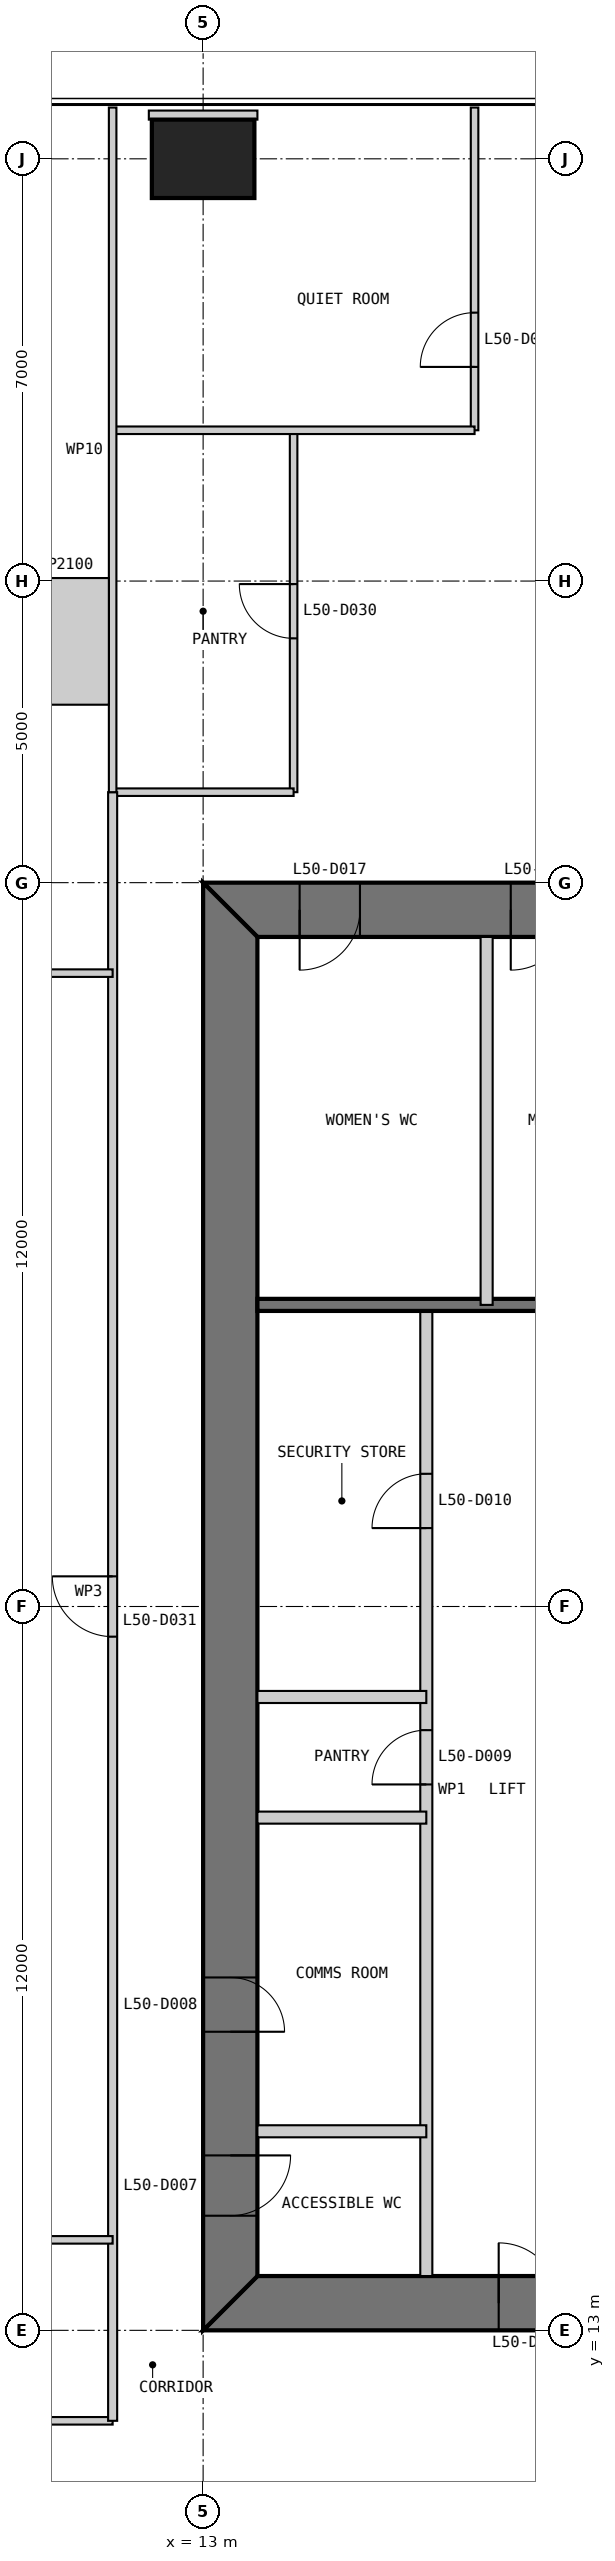
"""IFC4 building model, lengths in metres.
Left out: names, types, materials, properties, quantities, classifications, styles, units other than length and angle.
Written with IfcOpenShell. Run it as: python <this file> out.ifc"""

import sys

from ifc_helpers import new_model, si_unit, direction, frame, frame_2d, origin, origin_2d, place, context, subcontext, project, spatial, polyline, rectangle, outline, extrude, element, fill, save


model = new_model("IFC4")
c1 = context("Model", 3, precision=1e-05, world=origin(), true_north=direction((0.0, 1.0)))
c2 = subcontext(c1, "Body", "Model", "MODEL_VIEW")
j1 = project(units=[si_unit("LENGTHUNIT", "METRE"), si_unit("PLANEANGLEUNIT", "RADIAN")], contexts=[c1])
p1 = place(None, origin())
s1 = spatial("IfcSite", under=j1, at=p1, CompositionType="ELEMENT")
p2 = place(p1, origin())
s2 = spatial("IfcBuilding", under=s1, at=p2, CompositionType="ELEMENT")
p3 = place(p2, frame((0.0, 0.0, 213.8)))
s3 = spatial("IfcBuildingStorey", under=s2, at=p3, CompositionType="ELEMENT", Elevation=213.8)
p4 = place(p3, frame((13.0, 49.0, 0.0), z_axis=(0.0, 0.0, 1.0), x_axis=(1.0, 0.0, 0.0)))
e1 = element("IfcColumn", 1, at=p4, inside=s3, PredefinedType="COLUMN", context=c2, shape_type="SweptSolid", body=[
    extrude(rectangle(XDim=1.7, YDim=1.3, at=origin_2d()), origin(), (0.0, 0.0, 1.0), 4.0),
])
p5 = place(p3, frame((13.0, 13.45, 0.0), z_axis=(0.0, 0.0, 1.0), x_axis=(1.0, 0.0, 0.0)))
e2 = element("IfcWall", 2, at=p5, inside=s3, PredefinedType="SHEAR", context=c2, shape_type="SweptSolid", body=[
    extrude(outline(polyline([(0.0, -0.45), (24.0, -0.45), (23.1, 0.45), (0.9, 0.45), (0.0, -0.45)])), origin(), (0.0, 0.0, 1.0), 4.0),
])
p6 = place(p5, frame((4.9, 0.0, 0.0)))
e3 = element("IfcOpeningElement", 3, at=p6, cuts=e2, PredefinedType="OPENING", context=c2, shape_type="SweptSolid", body=[
    extrude(rectangle(XDim=1.0, YDim=2.2, at=frame_2d((0.5, 1.1))), frame((0.0, 0.46, 0.0), z_axis=(0.0, -1.0, 0.0), x_axis=(1.0, 0.0, 0.0)), (0.0, 0.0, 1.0), 0.92),
])
p7 = place(p5, frame((8.9, 0.0, 0.0)))
e4 = element("IfcOpeningElement", 4, at=p7, cuts=e2, PredefinedType="OPENING", context=c2, shape_type="SweptSolid", body=[
    extrude(rectangle(XDim=1.1, YDim=2.2, at=frame_2d((0.55, 1.1))), frame((0.0, 0.46, 0.0), z_axis=(0.0, -1.0, 0.0), x_axis=(1.0, 0.0, 0.0)), (0.0, 0.0, 1.0), 0.92),
])
p8 = place(p5, frame((15.05, 0.0, 0.0)))
e5 = element("IfcOpeningElement", 5, at=p8, cuts=e2, PredefinedType="OPENING", context=c2, shape_type="SweptSolid", body=[
    extrude(rectangle(XDim=0.9, YDim=2.2, at=frame_2d((0.45, 1.1))), frame((0.0, 0.46, 0.0), z_axis=(0.0, -1.0, 0.0), x_axis=(1.0, 0.0, 0.0)), (0.0, 0.0, 1.0), 0.92),
])
p9 = place(p5, frame((17.9, 0.0, 0.0)))
e6 = element("IfcOpeningElement", 6, at=p9, cuts=e2, PredefinedType="OPENING", context=c2, shape_type="SweptSolid", body=[
    extrude(rectangle(XDim=1.0, YDim=2.2, at=frame_2d((0.5, 1.1))), frame((0.0, 0.46, 0.0), z_axis=(0.0, -1.0, 0.0), x_axis=(1.0, 0.0, 0.0)), (0.0, 0.0, 1.0), 0.92),
])
p10 = place(p5, frame((21.4, 0.0, 0.0)))
e7 = element("IfcOpeningElement", 7, at=p10, cuts=e2, PredefinedType="OPENING", context=c2, shape_type="SweptSolid", body=[
    extrude(rectangle(XDim=1.0, YDim=2.2, at=frame_2d((0.5, 1.1))), frame((0.0, 0.46, 0.0), z_axis=(0.0, -1.0, 0.0), x_axis=(1.0, 0.0, 0.0)), (0.0, 0.0, 1.0), 0.92),
])
p11 = place(p3, frame((37.0, 36.55, 0.0), z_axis=(0.0, 0.0, 1.0), x_axis=(-1.0, 0.0, 0.0)))
e8 = element("IfcWall", 8, at=p11, inside=s3, PredefinedType="SHEAR", context=c2, shape_type="SweptSolid", body=[
    extrude(outline(polyline([(0.0, -0.45), (24.0, -0.45), (23.1, 0.45), (0.9, 0.45), (0.0, -0.45)])), origin(), (0.0, 0.0, 1.0), 4.0),
])
p12 = place(p11, frame((4.9, 0.0, 0.0)))
e9 = element("IfcOpeningElement", 9, at=p12, cuts=e8, PredefinedType="OPENING", context=c2, shape_type="SweptSolid", body=[
    extrude(rectangle(XDim=1.0, YDim=2.2, at=frame_2d((0.5, 1.1))), frame((0.0, 0.46, 0.0), z_axis=(0.0, -1.0, 0.0), x_axis=(1.0, 0.0, 0.0)), (0.0, 0.0, 1.0), 0.92),
])
p13 = place(p11, frame((8.9, 0.0, 0.0)))
e10 = element("IfcOpeningElement", 10, at=p13, cuts=e8, PredefinedType="OPENING", context=c2, shape_type="SweptSolid", body=[
    extrude(rectangle(XDim=1.1, YDim=2.2, at=frame_2d((0.55, 1.1))), frame((0.0, 0.46, 0.0), z_axis=(0.0, -1.0, 0.0), x_axis=(1.0, 0.0, 0.0)), (0.0, 0.0, 1.0), 0.92),
])
p14 = place(p11, frame((15.05, 0.0, 0.0)))
e11 = element("IfcOpeningElement", 11, at=p14, cuts=e8, PredefinedType="OPENING", context=c2, shape_type="SweptSolid", body=[
    extrude(rectangle(XDim=0.9, YDim=2.2, at=frame_2d((0.45, 1.1))), frame((0.0, 0.46, 0.0), z_axis=(0.0, -1.0, 0.0), x_axis=(1.0, 0.0, 0.0)), (0.0, 0.0, 1.0), 0.92),
])
p15 = place(p11, frame((17.9, 0.0, 0.0)))
e12 = element("IfcOpeningElement", 12, at=p15, cuts=e8, PredefinedType="OPENING", context=c2, shape_type="SweptSolid", body=[
    extrude(rectangle(XDim=1.0, YDim=2.2, at=frame_2d((0.5, 1.1))), frame((0.0, 0.46, 0.0), z_axis=(0.0, -1.0, 0.0), x_axis=(1.0, 0.0, 0.0)), (0.0, 0.0, 1.0), 0.92),
])
p16 = place(p11, frame((21.4, 0.0, 0.0)))
e13 = element("IfcOpeningElement", 13, at=p16, cuts=e8, PredefinedType="OPENING", context=c2, shape_type="SweptSolid", body=[
    extrude(rectangle(XDim=1.0, YDim=2.2, at=frame_2d((0.5, 1.1))), frame((0.0, 0.46, 0.0), z_axis=(0.0, -1.0, 0.0), x_axis=(1.0, 0.0, 0.0)), (0.0, 0.0, 1.0), 0.92),
])
p17 = place(p3, frame((13.45, 36.1, 0.0), z_axis=(0.0, 0.0, 1.0), x_axis=(0.0, -1.0, 0.0)))
e14 = element("IfcWall", 14, at=p17, inside=s3, PredefinedType="SHEAR", context=c2, shape_type="SweptSolid", body=[
    extrude(outline(polyline([(-0.9, -0.45), (23.1, -0.45), (22.2, 0.45), (0.0, 0.45), (-0.9, -0.45)])), origin(), (0.0, 0.0, 1.0), 4.0),
])
p18 = place(p17, frame((20.2, 0.0, 0.0)))
e15 = element("IfcOpeningElement", 15, at=p18, cuts=e14, PredefinedType="OPENING", context=c2, shape_type="SweptSolid", body=[
    extrude(rectangle(XDim=1.0, YDim=2.2, at=frame_2d((0.5, 1.1))), frame((0.0, 0.46, 0.0), z_axis=(0.0, -1.0, 0.0), x_axis=(1.0, 0.0, 0.0)), (0.0, 0.0, 1.0), 0.92),
])
p19 = place(p17, frame((17.25, 0.0, 0.0)))
e16 = element("IfcOpeningElement", 16, at=p19, cuts=e14, PredefinedType="OPENING", context=c2, shape_type="SweptSolid", body=[
    extrude(rectangle(XDim=0.9, YDim=2.2, at=frame_2d((0.45, 1.1))), frame((0.0, 0.46, 0.0), z_axis=(0.0, -1.0, 0.0), x_axis=(1.0, 0.0, 0.0)), (0.0, 0.0, 1.0), 0.92),
])
p20 = place(p3, frame((16.7, 13.9, 0.0), z_axis=(0.0, 0.0, 1.0), x_axis=(0.0, 1.0, 0.0)))
e17 = element("IfcWall", 17, at=p20, inside=s3, PredefinedType="PARTITIONING", context=c2, shape_type="SweptSolid", body=[
    extrude(rectangle(XDim=16.1, YDim=0.2, at=frame_2d((8.05, 0.0))), origin(), (0.0, 0.0, 1.0), 3.8),
])
p21 = place(p20, frame((8.15, 0.0, 0.0)))
e18 = element("IfcOpeningElement", 18, at=p21, cuts=e17, PredefinedType="OPENING", context=c2, shape_type="SweptSolid", body=[
    extrude(rectangle(XDim=0.9, YDim=2.2, at=frame_2d((0.45, 1.1))), frame((0.0, 0.11, 0.0), z_axis=(0.0, -1.0, 0.0), x_axis=(1.0, 0.0, 0.0)), (0.0, 0.0, 1.0), 0.22),
])
p22 = place(p20, frame((12.4, 0.0, 0.0)))
e19 = element("IfcOpeningElement", 19, at=p22, cuts=e17, PredefinedType="OPENING", context=c2, shape_type="SweptSolid", body=[
    extrude(rectangle(XDim=0.9, YDim=2.2, at=frame_2d((0.45, 1.1))), frame((0.0, 0.11, 0.0), z_axis=(0.0, -1.0, 0.0), x_axis=(1.0, 0.0, 0.0)), (0.0, 0.0, 1.0), 0.22),
])
for number, where, z_axis, x_axis in (
    (20, (13.9, 16.3, 0.0), (0.0, 0.0, 1.0), (1.0, 0.0, 0.0)),
    (21, (13.9, 21.5, 0.0), (0.0, 0.0, 1.0), (1.0, 0.0, 0.0)),
    (22, (13.9, 23.5, 0.0), (0.0, 0.0, 1.0), (1.0, 0.0, 0.0)),
):
    element("IfcWall", number, at=place(p3, frame(where, z_axis=z_axis, x_axis=x_axis)), inside=s3, PredefinedType="PARTITIONING", context=c2, shape_type="SweptSolid", body=[
        extrude(rectangle(XDim=2.8, YDim=0.2, at=frame_2d((1.4, 0.0))), origin(), (0.0, 0.0, 1.0), 3.8),
    ])
p23 = place(p3, frame((29.7, 30.0, 0.0), z_axis=(0.0, 0.0, 1.0), x_axis=(-1.0, 0.0, 0.0)))
e23 = element("IfcWall", 23, at=p23, inside=s3, PredefinedType="SOLIDWALL", context=c2, shape_type="SweptSolid", body=[
    extrude(rectangle(XDim=15.8, YDim=0.2, at=frame_2d((7.9, 0.0))), origin(), (0.0, 0.0, 1.0), 3.8),
])
p24 = place(p3, frame((17.7, 36.1, 0.0), z_axis=(0.0, 0.0, 1.0), x_axis=(0.0, -1.0, 0.0)))
e24 = element("IfcWall", 24, at=p24, inside=s3, PredefinedType="PARTITIONING", context=c2, shape_type="SweptSolid", body=[
    extrude(rectangle(XDim=6.1, YDim=0.2, at=frame_2d((3.05, 0.0))), origin(), (0.0, 0.0, 1.0), 3.8),
])
p25 = place(p3, frame((0.15, 11.5, 0.0), z_axis=(0.0, 0.0, 1.0), x_axis=(1.0, 0.0, 0.0)))
e25 = element("IfcWall", 25, at=p25, inside=s3, PredefinedType="PARTITIONING", context=c2, shape_type="SweptSolid", body=[
    extrude(rectangle(XDim=11.35, YDim=0.125, at=frame_2d((5.675, 0.0))), origin(), (0.0, 0.0, 1.0), 3.85),
])
p26 = place(p3, frame((17.5, 49.85, 0.0), z_axis=(0.0, 0.0, 1.0), x_axis=(0.0, -1.0, 0.0)))
e26 = element("IfcWall", 26, at=p26, inside=s3, PredefinedType="PARTITIONING", context=c2, shape_type="SweptSolid", body=[
    extrude(rectangle(XDim=5.35, YDim=0.125, at=frame_2d((2.675, 0.0))), origin(), (0.0, 0.0, 1.0), 3.85),
])
p27 = place(p26, frame((3.4, 0.0, 0.0)))
e27 = element("IfcOpeningElement", 27, at=p27, cuts=e26, PredefinedType="OPENING", context=c2, shape_type="SweptSolid", body=[
    extrude(rectangle(XDim=0.9, YDim=2.2, at=frame_2d((0.45, 1.1))), frame((0.0, 0.073, 0.0), z_axis=(0.0, -1.0, 0.0), x_axis=(1.0, 0.0, 0.0)), (0.0, 0.0, 1.0), 0.145),
])
p28 = place(p3, frame((14.5, 44.5, 0.0), z_axis=(0.0, 0.0, 1.0), x_axis=(0.0, -1.0, 0.0)))
e28 = element("IfcWall", 28, at=p28, inside=s3, PredefinedType="PARTITIONING", context=c2, shape_type="SweptSolid", body=[
    extrude(rectangle(XDim=6.0, YDim=0.125, at=frame_2d((3.0, 0.0))), origin(), (0.0, 0.0, 1.0), 3.85),
])
p29 = place(p28, frame((2.55, 0.0, 0.0)))
e29 = element("IfcOpeningElement", 29, at=p29, cuts=e28, PredefinedType="OPENING", context=c2, shape_type="SweptSolid", body=[
    extrude(rectangle(XDim=0.9, YDim=2.2, at=frame_2d((0.45, 1.1))), frame((0.0, 0.073, 0.0), z_axis=(0.0, -1.0, 0.0), x_axis=(1.0, 0.0, 0.0)), (0.0, 0.0, 1.0), 0.145),
])
p30 = place(p3, frame((17.5, 44.5, 0.0), z_axis=(0.0, 0.0, 1.0), x_axis=(-1.0, 0.0, 0.0)))
e30 = element("IfcWall", 30, at=p30, inside=s3, PredefinedType="PARTITIONING", context=c2, shape_type="SweptSolid", body=[
    extrude(rectangle(XDim=6.0, YDim=0.125, at=frame_2d((3.0, 0.0))), origin(), (0.0, 0.0, 1.0), 3.85),
])
p31 = place(p3, frame((14.5, 38.5, 0.0), z_axis=(0.0, 0.0, 1.0), x_axis=(-1.0, 0.0, 0.0)))
e31 = element("IfcWall", 31, at=p31, inside=s3, PredefinedType="PARTITIONING", context=c2, shape_type="SweptSolid", body=[
    extrude(rectangle(XDim=3.0, YDim=0.125, at=frame_2d((1.5, 0.0))), origin(), (0.0, 0.0, 1.0), 3.85),
])
p32 = place(p3, frame((11.5, 38.5, 0.0), z_axis=(0.0, 0.0, 1.0), x_axis=(0.0, -1.0, 0.0)))
e32 = element("IfcWall", 32, at=p32, inside=s3, PredefinedType="PARTITIONING", context=c2, shape_type="SweptSolid", body=[
    extrude(rectangle(XDim=27.0, YDim=0.15, at=frame_2d((13.5, 0.0))), origin(), (0.0, 0.0, 1.0), 3.85),
])
p33 = place(p32, frame((13.0, 0.0, 0.0)))
e33 = element("IfcOpeningElement", 33, at=p33, cuts=e32, PredefinedType="OPENING", context=c2, shape_type="SweptSolid", body=[
    extrude(rectangle(XDim=1.0, YDim=2.2, at=frame_2d((0.5, 1.1))), frame((0.0, 0.085, 0.0), z_axis=(0.0, -1.0, 0.0), x_axis=(1.0, 0.0, 0.0)), (0.0, 0.0, 1.0), 0.17),
])
p34 = place(p3, frame((11.5, 49.85, 0.0), z_axis=(0.0, 0.0, 1.0), x_axis=(0.0, -1.0, 0.0)))
e34 = element("IfcWall", 34, at=p34, inside=s3, PredefinedType="PARTITIONING", context=c2, shape_type="SweptSolid", body=[
    extrude(rectangle(XDim=11.35, YDim=0.125, at=frame_2d((5.675, 0.0))), origin(), (0.0, 0.0, 1.0), 3.85),
])
p35 = place(p3, frame((0.15, 35.5, 0.0), z_axis=(0.0, 0.0, 1.0), x_axis=(1.0, 0.0, 0.0)))
e35 = element("IfcWall", 35, at=p35, inside=s3, PredefinedType="PARTITIONING", context=c2, shape_type="SweptSolid", body=[
    extrude(rectangle(XDim=11.35, YDim=0.125, at=frame_2d((5.675, 0.0))), origin(), (0.0, 0.0, 1.0), 3.85),
])
p36 = place(p35, frame((7.9, 0.0, 0.0)))
e36 = element("IfcOpeningElement", 36, at=p36, cuts=e35, PredefinedType="OPENING", context=c2, shape_type="SweptSolid", body=[
    extrude(rectangle(XDim=0.9, YDim=2.2, at=frame_2d((0.45, 1.1))), frame((0.0, 0.073, 0.0), z_axis=(0.0, -1.0, 0.0), x_axis=(1.0, 0.0, 0.0)), (0.0, 0.0, 1.0), 0.145),
])
p37 = place(p3, frame((5.5, 14.5, 0.0), z_axis=(0.0, 0.0, 1.0), x_axis=(1.0, 0.0, 0.0)))
e37 = element("IfcWall", 37, at=p37, inside=s3, PredefinedType="PARTITIONING", context=c2, shape_type="SweptSolid", body=[
    extrude(rectangle(XDim=6.0, YDim=0.125, at=frame_2d((3.0, 0.0))), origin(), (0.0, 0.0, 1.0), 3.85),
])
p38 = place(p37, frame((2.55, 0.0, 0.0)))
e38 = element("IfcOpeningElement", 38, at=p38, cuts=e37, PredefinedType="OPENING", context=c2, shape_type="SweptSolid", body=[
    extrude(rectangle(XDim=0.9, YDim=2.2, at=frame_2d((0.45, 1.1))), frame((0.0, 0.073, 0.0), z_axis=(0.0, -1.0, 0.0), x_axis=(1.0, 0.0, 0.0)), (0.0, 0.0, 1.0), 0.145),
])
p39 = place(p3, frame((13.0, 49.8, 0.0), z_axis=(0.0, 0.0, 1.0), x_axis=(0.0, -1.0, 0.0)))
e39 = element("IfcWall", 39, at=p39, inside=s3, PredefinedType="PARTITIONING", context=c2, shape_type="SweptSolid", body=[
    extrude(rectangle(XDim=0.15, YDim=1.8, at=frame_2d((0.075, 0.0))), origin(), (0.0, 0.0, 1.0), 3.85),
])
p40 = place(p3, frame((11.438, 41.0, 0.0), z_axis=(0.0, 0.0, 1.0), x_axis=(-1.0, 0.0, 0.0)))
e40 = element("IfcWall", 40, at=p40, inside=s3, PredefinedType="PARTITIONING", context=c2, shape_type="SweptSolid", body=[
    extrude(rectangle(XDim=1.438, YDim=2.1, at=frame_2d((0.719, 0.0))), origin(), (0.0, 0.0, 1.0), 3.85),
])
p41 = place(p6, origin())
e41 = element("IfcDoor", 41, at=p41, inside=s3, OperationType="SINGLE_SWING_LEFT", PredefinedType="DOOR", context=c2, shape_type="SweptSolid", body=[
    extrude(rectangle(XDim=1.0, YDim=2.2, at=frame_2d((0.5, 1.1))), frame((0.0, 0.025, 0.0), z_axis=(0.0, -1.0, 0.0), x_axis=(1.0, 0.0, 0.0)), (0.0, 0.0, 1.0), 0.05),
    extrude(outline(polyline([(0.0, 0.0), (0.04, 0.0), (0.04, 2.16), (0.96, 2.16), (0.96, 0.0), (1.0, 0.0), (1.0, 2.2), (0.0, 2.2), (0.0, 0.0)])), frame((0.0, 0.3, 0.0), z_axis=(0.0, -1.0, 0.0), x_axis=(1.0, 0.0, 0.0)), (0.0, 0.0, 1.0), 0.6),
])
fill(e3, e41)
p42 = place(p18, origin())
e42 = element("IfcDoor", 42, at=p42, inside=s3, OperationType="SINGLE_SWING_LEFT", PredefinedType="DOOR", context=c2, shape_type="SweptSolid", body=[
    extrude(rectangle(XDim=1.0, YDim=2.2, at=frame_2d((0.5, 1.1))), frame((0.0, 0.025, 0.0), z_axis=(0.0, -1.0, 0.0), x_axis=(1.0, 0.0, 0.0)), (0.0, 0.0, 1.0), 0.05),
    extrude(outline(polyline([(0.0, 0.0), (0.04, 0.0), (0.04, 2.16), (0.96, 2.16), (0.96, 0.0), (1.0, 0.0), (1.0, 2.2), (0.0, 2.2), (0.0, 0.0)])), frame((0.0, 0.3, 0.0), z_axis=(0.0, -1.0, 0.0), x_axis=(1.0, 0.0, 0.0)), (0.0, 0.0, 1.0), 0.6),
])
fill(e15, e42)
p43 = place(p19, origin())
e43 = element("IfcDoor", 43, at=p43, inside=s3, OperationType="SINGLE_SWING_RIGHT", PredefinedType="DOOR", context=c2, shape_type="SweptSolid", body=[
    extrude(rectangle(XDim=0.9, YDim=2.2, at=frame_2d((0.45, 1.1))), frame((0.0, 0.025, 0.0), z_axis=(0.0, -1.0, 0.0), x_axis=(1.0, 0.0, 0.0)), (0.0, 0.0, 1.0), 0.05),
    extrude(outline(polyline([(0.0, 0.0), (0.04, 0.0), (0.04, 2.16), (0.86, 2.16), (0.86, 0.0), (0.9, 0.0), (0.9, 2.2), (0.0, 2.2), (0.0, 0.0)])), frame((0.0, 0.3, 0.0), z_axis=(0.0, -1.0, 0.0), x_axis=(1.0, 0.0, 0.0)), (0.0, 0.0, 1.0), 0.6),
])
fill(e16, e43)
p44 = place(p21, origin())
e44 = element("IfcDoor", 44, at=p44, inside=s3, OperationType="SINGLE_SWING_LEFT", PredefinedType="DOOR", context=c2, shape_type="SweptSolid", body=[
    extrude(rectangle(XDim=0.9, YDim=2.2, at=frame_2d((0.45, 1.1))), frame((0.0, 0.025, 0.0), z_axis=(0.0, -1.0, 0.0), x_axis=(1.0, 0.0, 0.0)), (0.0, 0.0, 1.0), 0.05),
])
fill(e18, e44)
p45 = place(p22, origin())
e45 = element("IfcDoor", 45, at=p45, inside=s3, OperationType="SINGLE_SWING_LEFT", PredefinedType="DOOR", context=c2, shape_type="SweptSolid", body=[
    extrude(rectangle(XDim=0.9, YDim=2.2, at=frame_2d((0.45, 1.1))), frame((0.0, 0.025, 0.0), z_axis=(0.0, -1.0, 0.0), x_axis=(1.0, 0.0, 0.0)), (0.0, 0.0, 1.0), 0.05),
])
fill(e19, e45)
p46 = place(p15, origin())
e46 = element("IfcDoor", 46, at=p46, inside=s3, OperationType="SINGLE_SWING_RIGHT", PredefinedType="DOOR", context=c2, shape_type="SweptSolid", body=[
    extrude(rectangle(XDim=1.0, YDim=2.2, at=frame_2d((0.5, 1.1))), frame((0.0, 0.025, 0.0), z_axis=(0.0, -1.0, 0.0), x_axis=(1.0, 0.0, 0.0)), (0.0, 0.0, 1.0), 0.05),
    extrude(outline(polyline([(0.0, 0.0), (0.04, 0.0), (0.04, 2.16), (0.96, 2.16), (0.96, 0.0), (1.0, 0.0), (1.0, 2.2), (0.0, 2.2), (0.0, 0.0)])), frame((0.0, 0.3, 0.0), z_axis=(0.0, -1.0, 0.0), x_axis=(1.0, 0.0, 0.0)), (0.0, 0.0, 1.0), 0.6),
])
fill(e12, e46)
p47 = place(p16, origin())
e47 = element("IfcDoor", 47, at=p47, inside=s3, OperationType="SINGLE_SWING_RIGHT", PredefinedType="DOOR", context=c2, shape_type="SweptSolid", body=[
    extrude(rectangle(XDim=1.0, YDim=2.2, at=frame_2d((0.5, 1.1))), frame((0.0, 0.025, 0.0), z_axis=(0.0, -1.0, 0.0), x_axis=(1.0, 0.0, 0.0)), (0.0, 0.0, 1.0), 0.05),
    extrude(outline(polyline([(0.0, 0.0), (0.04, 0.0), (0.04, 2.16), (0.96, 2.16), (0.96, 0.0), (1.0, 0.0), (1.0, 2.2), (0.0, 2.2), (0.0, 0.0)])), frame((0.0, 0.3, 0.0), z_axis=(0.0, -1.0, 0.0), x_axis=(1.0, 0.0, 0.0)), (0.0, 0.0, 1.0), 0.6),
])
fill(e13, e47)
p48 = place(p27, frame((0.9, 0.0, 0.0), z_axis=(0.0, 0.0, 1.0), x_axis=(-1.0, 0.0, 0.0)))
e48 = element("IfcDoor", 48, at=p48, inside=s3, OperationType="SINGLE_SWING_LEFT", PredefinedType="DOOR", context=c2, shape_type="SweptSolid", body=[
    extrude(rectangle(XDim=0.9, YDim=2.2, at=frame_2d((0.45, 1.1))), frame((0.0, 0.025, 0.0), z_axis=(0.0, -1.0, 0.0), x_axis=(1.0, 0.0, 0.0)), (0.0, 0.0, 1.0), 0.05),
])
fill(e27, e48)
p49 = place(p29, frame((0.9, 0.0, 0.0), z_axis=(0.0, 0.0, 1.0), x_axis=(-1.0, 0.0, 0.0)))
e49 = element("IfcDoor", 49, at=p49, inside=s3, OperationType="SINGLE_SWING_RIGHT", PredefinedType="DOOR", context=c2, shape_type="SweptSolid", body=[
    extrude(rectangle(XDim=0.9, YDim=2.2, at=frame_2d((0.45, 1.1))), frame((0.0, 0.025, 0.0), z_axis=(0.0, -1.0, 0.0), x_axis=(1.0, 0.0, 0.0)), (0.0, 0.0, 1.0), 0.05),
])
fill(e29, e49)
p50 = place(p33, frame((1.0, 0.0, 0.0), z_axis=(0.0, 0.0, 1.0), x_axis=(-1.0, 0.0, 0.0)))
e50 = element("IfcDoor", 50, at=p50, inside=s3, OperationType="SINGLE_SWING_RIGHT", PredefinedType="DOOR", context=c2, shape_type="SweptSolid", body=[
    extrude(rectangle(XDim=1.0, YDim=2.2, at=frame_2d((0.5, 1.1))), frame((0.0, 0.025, 0.0), z_axis=(0.0, -1.0, 0.0), x_axis=(1.0, 0.0, 0.0)), (0.0, 0.0, 1.0), 0.05),
])
fill(e33, e50)
save(model, sys.argv[1])
